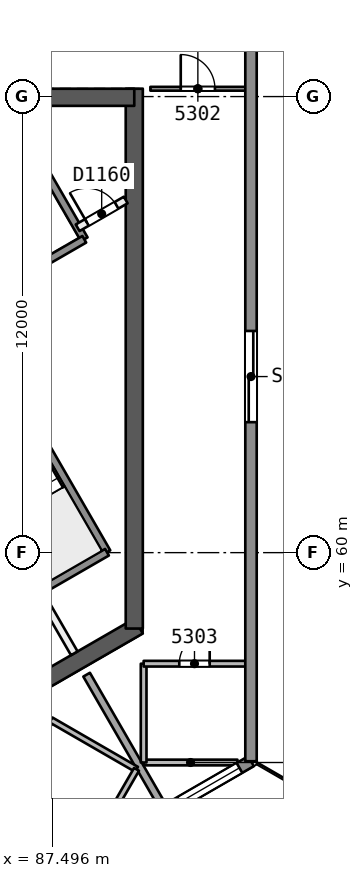
"""IFC4 building model, lengths in metres.
Left out: names, types, materials, properties, quantities, classifications, styles, units other than length and angle.
Written with IfcOpenShell. Run it as: python <this file> out.ifc"""

import sys

from ifc_helpers import new_model, si_unit, direction, frame, frame_2d, origin, place, context, subcontext, project, spatial, rectangle, extrude, element, fill, save


model = new_model("IFC4")
c1 = context("Model", 3, precision=1e-05, world=origin(), true_north=direction((0.0, 1.0)))
c2 = subcontext(c1, "Body", "Model", "MODEL_VIEW")
j1 = project(units=[si_unit("LENGTHUNIT", "METRE"), si_unit("PLANEANGLEUNIT", "RADIAN")], contexts=[c1])
p1 = place(None, origin())
s1 = spatial("IfcSite", under=j1, at=p1, CompositionType="ELEMENT")
p2 = place(p1, origin())
s2 = spatial("IfcBuilding", under=s1, at=p2, CompositionType="ELEMENT")
p3 = place(p2, frame((0.0, 0.0, 216.9)))
s3 = spatial("IfcBuildingStorey", under=s2, at=p3, CompositionType="ELEMENT", Elevation=216.9)
p4 = place(p3, frame((86.723, 56.31, 0.0), z_axis=(0.0, 0.0, 1.0), x_axis=(0.866042179588, 0.49997094233, 0.0)))
e1 = element("IfcWall", 1, at=p4, inside=s3, PredefinedType="SHEAR", context=c2, shape_type="SweptSolid", body=[
    extrude(rectangle(XDim=3.515, YDim=0.45, at=frame_2d((1.758, 0.0))), origin(), (0.0, 0.0, 1.0), 3.7),
])
p5 = place(p3, frame((89.655, 58.002, 0.0), z_axis=(0.0, 0.0, 1.0), x_axis=(0.0, 1.0, 0.0)))
e2 = element("IfcWall", 2, at=p5, inside=s3, PredefinedType="SHEAR", context=c2, shape_type="SweptSolid", body=[
    extrude(rectangle(XDim=14.204, YDim=0.45, at=frame_2d((7.102, 0.0))), origin(), (0.0, 0.0, 1.0), 3.7),
])
p6 = place(p3, frame((89.655, 71.981, 0.0), z_axis=(0.0, 0.0, 1.0), x_axis=(-1.0, 0.0, 0.0)))
e3 = element("IfcWall", 3, at=p6, inside=s3, PredefinedType="SHEAR", context=c2, shape_type="SweptSolid", body=[
    extrude(rectangle(XDim=10.155, YDim=0.45, at=frame_2d((5.078, 0.0))), origin(), (0.0, 0.0, 1.0), 3.7),
])
p7 = place(p6, frame((8.005, 0.0, 0.0)))
e4 = element("IfcOpeningElement", 4, at=p7, cuts=e3, PredefinedType="OPENING", context=c2, shape_type="SweptSolid", body=[
    extrude(rectangle(XDim=1.2, YDim=2.1, at=frame_2d((0.6, 1.05))), frame((0.0, 0.235, 0.0), z_axis=(0.0, -1.0, 0.0), x_axis=(1.0, 0.0, 0.0)), (0.0, 0.0, 1.0), 0.471),
])
p8 = place(p3, frame((90.079, 72.206, 0.0), z_axis=(0.0, 0.0, 1.0), x_axis=(1.0, 0.0, 0.0)))
e5 = element("IfcWall", 5, at=p8, inside=s3, PredefinedType="PARTITIONING", context=c2, shape_type="SweptSolid", body=[
    extrude(rectangle(XDim=2.499, YDim=0.1, at=frame_2d((1.249, 0.0))), origin(), (0.0, 0.0, 1.0), 3.3),
])
p9 = place(p8, frame((0.799, 0.0, 0.0)))
e6 = element("IfcOpeningElement", 6, at=p9, cuts=e5, PredefinedType="OPENING", context=c2, shape_type="SweptSolid", body=[
    extrude(rectangle(XDim=0.9, YDim=2.1, at=frame_2d((0.45, 1.05))), frame((0.0, 0.061, 0.0), z_axis=(0.0, -1.0, 0.0), x_axis=(1.0, 0.0, 0.0)), (0.0, 0.0, 1.0), 0.121),
])
p10 = place(p3, frame((92.37, 54.478, 0.0), z_axis=(0.0, 0.0, 1.0), x_axis=(-1.0, 0.0, 0.0)))
e7 = element("IfcWall", 7, at=p10, inside=s3, PredefinedType="PARTITIONING", context=c2, shape_type="SweptSolid", body=[
    extrude(rectangle(XDim=2.469, YDim=0.15, at=frame_2d((1.234, 0.0))), origin(), (0.0, 0.0, 1.0), 3.3),
])
p11 = place(p3, frame((89.902, 54.478, 0.0), z_axis=(0.0, 0.0, 1.0), x_axis=(0.0, 1.0, 0.0)))
e8 = element("IfcWall", 8, at=p11, inside=s3, PredefinedType="PARTITIONING", context=c2, shape_type="SweptSolid", body=[
    extrude(rectangle(XDim=2.6, YDim=0.15, at=frame_2d((1.3, 0.0))), origin(), (0.0, 0.0, 1.0), 3.3),
])
p12 = place(p3, frame((89.902, 57.078, 0.0), z_axis=(0.0, 0.0, 1.0), x_axis=(1.0, 0.0, 0.0)))
e9 = element("IfcWall", 9, at=p12, inside=s3, PredefinedType="PARTITIONING", context=c2, shape_type="SweptSolid", body=[
    extrude(rectangle(XDim=2.676, YDim=0.15, at=frame_2d((1.338, 0.0))), origin(), (0.0, 0.0, 1.0), 3.3),
])
p13 = place(p12, frame((0.938, 0.0, 0.0)))
e10 = element("IfcOpeningElement", 10, at=p13, cuts=e9, PredefinedType="OPENING", context=c2, shape_type="SweptSolid", body=[
    extrude(rectangle(XDim=0.8, YDim=2.1, at=frame_2d((0.4, 1.05))), frame((0.0, 0.085, 0.0), z_axis=(0.0, -1.0, 0.0), x_axis=(1.0, 0.0, 0.0)), (0.0, 0.0, 1.0), 0.171),
])
p14 = place(p3, frame((88.401, 56.789, 0.0), z_axis=(0.0, 0.0, 1.0), x_axis=(0.49999285859, -0.86602952684, 0.0)))
e11 = element("IfcWall", 11, at=p14, inside=s3, PredefinedType="PARTITIONING", context=c2, shape_type="SweptSolid", body=[
    extrude(rectangle(XDim=3.986, YDim=0.2, at=frame_2d((1.993, 0.0))), origin(), (0.0, 0.0, 1.0), 3.3),
])
p15 = place(p3, frame((86.125, 53.28, 0.0), z_axis=(0.0, 0.0, 1.0), x_axis=(0.500054140411, 0.865994143547, 0.0)))
e12 = element("IfcWall", 12, at=p15, inside=s3, PredefinedType="PARTITIONING", context=c2, shape_type="SweptSolid", body=[
    extrude(rectangle(XDim=2.676, YDim=0.15, at=frame_2d((1.338, 0.0))), origin(), (0.0, 0.0, 1.0), 3.3),
])
p16 = place(p15, frame((0.938, 0.0, 0.0)))
e13 = element("IfcOpeningElement", 13, at=p16, cuts=e12, PredefinedType="OPENING", context=c2, shape_type="SweptSolid", body=[
    extrude(rectangle(XDim=0.8, YDim=2.1, at=frame_2d((0.4, 1.05))), frame((0.0, 0.085, 0.0), z_axis=(0.0, -1.0, 0.0), x_axis=(1.0, 0.0, 0.0)), (0.0, 0.0, 1.0), 0.171),
])
p17 = place(p3, frame((87.463, 55.598, 0.0), z_axis=(0.0, 0.0, 1.0), x_axis=(0.866062058628, -0.499936506574, 0.0)))
e14 = element("IfcWall", 14, at=p17, inside=s3, PredefinedType="PARTITIONING", context=c2, shape_type="SweptSolid", body=[
    extrude(rectangle(XDim=2.6, YDim=0.15, at=frame_2d((1.3, 0.0))), origin(), (0.0, 0.0, 1.0), 3.3),
])
p18 = place(p3, frame((89.715, 54.298, 0.0), z_axis=(0.0, 0.0, 1.0), x_axis=(-0.500025973189, -0.866010407637, 0.0)))
e15 = element("IfcWall", 15, at=p18, inside=s3, PredefinedType="PARTITIONING", context=c2, shape_type="SweptSolid", body=[
    extrude(rectangle(XDim=2.344, YDim=0.15, at=frame_2d((1.172, 0.0))), origin(), (0.0, 0.0, 1.0), 3.3),
])
p19 = place(p3, frame((92.727, 54.511, 0.0), z_axis=(0.0, 0.0, 1.0), x_axis=(-0.866045268016, -0.499965592563, 0.0)))
e16 = element("IfcWall", 16, at=p19, inside=s3, PredefinedType="SOLIDWALL", context=c2, shape_type="SweptSolid", body=[
    extrude(rectangle(XDim=5.215, YDim=0.3, at=frame_2d((2.607, 0.0))), origin(), (0.0, 0.0, 1.0), 3.3),
])
p20 = place(p19, frame((0.351, 0.0, 0.9)))
e17 = element("IfcOpeningElement", 17, at=p20, cuts=e16, PredefinedType="OPENING", context=c2, shape_type="SweptSolid", body=[
    extrude(rectangle(XDim=1.8, YDim=1.5, at=frame_2d((0.9, 0.75))), frame((0.0, 0.161, 0.0), z_axis=(0.0, -1.0, 0.0), x_axis=(1.0, 0.0, 0.0)), (0.0, 0.0, 1.0), 0.321),
])
p21 = place(p19, frame((3.036, 0.0, 0.9)))
e18 = element("IfcOpeningElement", 18, at=p21, cuts=e16, PredefinedType="OPENING", context=c2, shape_type="SweptSolid", body=[
    extrude(rectangle(XDim=1.8, YDim=1.5, at=frame_2d((0.9, 0.75))), frame((0.0, 0.161, 0.0), z_axis=(0.0, -1.0, 0.0), x_axis=(1.0, 0.0, 0.0)), (0.0, 0.0, 1.0), 0.321),
])
p22 = place(p3, frame((92.727, 105.489, 0.0), z_axis=(0.0, 0.0, 1.0), x_axis=(0.0, -1.0, 0.0)))
e19 = element("IfcWall", 19, at=p22, inside=s3, PredefinedType="SOLIDWALL", context=c2, shape_type="SweptSolid", body=[
    extrude(rectangle(XDim=50.977, YDim=0.3, at=frame_2d((25.489, 0.0))), origin(), (0.0, 0.0, 1.0), 3.3),
])
p23 = place(p22, frame((9.942, 0.0, 0.0)))
e20 = element("IfcOpeningElement", 20, at=p23, cuts=e19, PredefinedType="OPENING", context=c2, shape_type="SweptSolid", body=[
    extrude(rectangle(XDim=2.4, YDim=2.4, at=frame_2d((1.2, 1.2))), frame((0.0, 0.161, 0.0), z_axis=(0.0, -1.0, 0.0), x_axis=(1.0, 0.0, 0.0)), (0.0, 0.0, 1.0), 0.321),
])
p24 = place(p22, frame((28.965, 0.0, 0.0)))
e21 = element("IfcOpeningElement", 21, at=p24, cuts=e19, PredefinedType="OPENING", context=c2, shape_type="SweptSolid", body=[
    extrude(rectangle(XDim=2.4, YDim=2.4, at=frame_2d((1.2, 1.2))), frame((0.0, 0.161, 0.0), z_axis=(0.0, -1.0, 0.0), x_axis=(1.0, 0.0, 0.0)), (0.0, 0.0, 1.0), 0.321),
])
p25 = place(p22, frame((39.656, 0.0, 0.0)))
e22 = element("IfcOpeningElement", 22, at=p25, cuts=e19, PredefinedType="OPENING", context=c2, shape_type="SweptSolid", body=[
    extrude(rectangle(XDim=2.4, YDim=2.4, at=frame_2d((1.2, 1.2))), frame((0.0, 0.161, 0.0), z_axis=(0.0, -1.0, 0.0), x_axis=(1.0, 0.0, 0.0)), (0.0, 0.0, 1.0), 0.321),
])
p26 = place(p22, frame((23.509, 0.0, 0.0)))
e23 = element("IfcOpeningElement", 23, at=p26, cuts=e19, PredefinedType="OPENING", context=c2, shape_type="SweptSolid", body=[
    extrude(rectangle(XDim=2.4, YDim=2.4, at=frame_2d((1.2, 1.2))), frame((0.0, 0.161, 0.0), z_axis=(0.0, -1.0, 0.0), x_axis=(1.0, 0.0, 0.0)), (0.0, 0.0, 1.0), 0.321),
])
p27 = place(p3, frame((88.21, 51.904, 0.0), z_axis=(0.0, 0.0, 1.0), x_axis=(-0.866024402399, 0.500001734447, 0.0)))
e24 = element("IfcWall", 24, at=p27, inside=s3, PredefinedType="SOLIDWALL", context=c2, shape_type="SweptSolid", body=[
    extrude(rectangle(XDim=50.977, YDim=0.3, at=frame_2d((25.488, 0.0))), origin(), (0.0, 0.0, 1.0), 3.3),
])
p28 = place(p27, frame((24.756, 0.0, 0.0)))
e25 = element("IfcOpeningElement", 25, at=p28, cuts=e24, PredefinedType="OPENING", context=c2, shape_type="SweptSolid", body=[
    extrude(rectangle(XDim=2.4, YDim=2.4, at=frame_2d((1.2, 1.2))), frame((0.0, 0.161, 0.0), z_axis=(0.0, -1.0, 0.0), x_axis=(1.0, 0.0, 0.0)), (0.0, 0.0, 1.0), 0.321),
])
p29 = place(p27, frame((19.612, 0.0, 0.0)))
e26 = element("IfcOpeningElement", 26, at=p29, cuts=e24, PredefinedType="OPENING", context=c2, shape_type="SweptSolid", body=[
    extrude(rectangle(XDim=2.4, YDim=2.4, at=frame_2d((1.2, 1.2))), frame((0.0, 0.161, 0.0), z_axis=(0.0, -1.0, 0.0), x_axis=(1.0, 0.0, 0.0)), (0.0, 0.0, 1.0), 0.321),
])
p30 = place(p27, frame((8.885, 0.0, 0.0)))
e27 = element("IfcOpeningElement", 27, at=p30, cuts=e24, PredefinedType="OPENING", context=c2, shape_type="SweptSolid", body=[
    extrude(rectangle(XDim=2.4, YDim=2.4, at=frame_2d((1.2, 1.2))), frame((0.0, 0.161, 0.0), z_axis=(0.0, -1.0, 0.0), x_axis=(1.0, 0.0, 0.0)), (0.0, 0.0, 1.0), 0.321),
])
p31 = place(p27, frame((38.323, 0.0, 0.0)))
e28 = element("IfcOpeningElement", 28, at=p31, cuts=e24, PredefinedType="OPENING", context=c2, shape_type="SweptSolid", body=[
    extrude(rectangle(XDim=2.4, YDim=2.4, at=frame_2d((1.2, 1.2))), frame((0.0, 0.161, 0.0), z_axis=(0.0, -1.0, 0.0), x_axis=(1.0, 0.0, 0.0)), (0.0, 0.0, 1.0), 0.321),
])
p32 = place(p3, frame((87.09, 59.06, 0.0), z_axis=(0.0, 0.0, 1.0), x_axis=(0.500011643316, -0.866018681408, 0.0)))
e29 = element("IfcWall", 29, at=p32, inside=s3, PredefinedType="PARTITIONING", context=c2, shape_type="SweptSolid", body=[
    extrude(rectangle(XDim=1.973, YDim=0.2, at=frame_2d((0.987, 0.0))), origin(), (0.0, 0.0, 1.0), 3.3),
])
p33 = place(p3, frame((85.087, 66.679, 0.0), z_axis=(0.0, 0.0, 1.0), x_axis=(0.500019787375, -0.866013979237, 0.0)))
e30 = element("IfcWall", 30, at=p33, inside=s3, PredefinedType="SOLIDWALL", context=c2, shape_type="SweptSolid", body=[
    extrude(rectangle(XDim=7.7, YDim=0.2, at=frame_2d((3.85, 0.0))), origin(), (0.0, 0.0, 1.0), 3.3),
])
p34 = place(p33, frame((0.55, 0.0, 0.0)))
e31 = element("IfcOpeningElement", 31, at=p34, cuts=e30, PredefinedType="OPENING", context=c2, shape_type="SweptSolid", body=[
    extrude(rectangle(XDim=1.1, YDim=2.1, at=frame_2d((0.55, 1.05))), frame((0.0, 0.11, 0.0), z_axis=(0.0, -1.0, 0.0), x_axis=(1.0, 0.0, 0.0)), (0.0, 0.0, 1.0), 0.221),
])
p35 = place(p3, frame((86.965, 70.626, 0.0), z_axis=(0.0, 0.0, 1.0), x_axis=(0.499996545922, -0.866027397988, 0.0)))
e32 = element("IfcWall", 32, at=p35, inside=s3, PredefinedType="SOLIDWALL", context=c2, shape_type="SweptSolid", body=[
    extrude(rectangle(XDim=2.75, YDim=0.2, at=frame_2d((1.375, 0.0))), origin(), (0.0, 0.0, 1.0), 3.3),
])
p36 = place(p3, frame((88.165, 68.548, 0.0), z_axis=(0.0, 0.0, 1.0), x_axis=(0.866013036001, 0.500021421018, 0.0)))
e33 = element("IfcWall", 33, at=p36, inside=s3, PredefinedType="PARTITIONING", context=c2, shape_type="SweptSolid", body=[
    extrude(rectangle(XDim=1.461, YDim=0.2, at=frame_2d((0.73, 0.0))), origin(), (0.0, 0.0, 1.0), 3.3),
])
p37 = place(p36, frame((0.281, 0.0, 0.0)))
e34 = element("IfcOpeningElement", 34, at=p37, cuts=e33, PredefinedType="OPENING", context=c2, shape_type="SweptSolid", body=[
    extrude(rectangle(XDim=0.9, YDim=2.1, at=frame_2d((0.45, 1.05))), frame((0.0, 0.11, 0.0), z_axis=(0.0, -1.0, 0.0), x_axis=(1.0, 0.0, 0.0)), (0.0, 0.0, 1.0), 0.221),
])
p38 = place(p3, frame((86.348, 67.095, 0.0), z_axis=(0.0, 0.0, 1.0), x_axis=(0.86602648383, 0.499998129301, 0.0)))
e35 = element("IfcWall", 35, at=p38, inside=s3, PredefinedType="SOLIDWALL", context=c2, shape_type="SweptSolid", body=[
    extrude(rectangle(XDim=2.3, YDim=0.2, at=frame_2d((1.15, 0.0))), origin(), (0.0, 0.0, 1.0), 3.3),
])
p39 = place(p3, frame((85.343, 57.935, 0.0), z_axis=(0.0, 0.0, 1.0), x_axis=(0.866004344652, 0.500036473714, 0.0)))
e36 = element("IfcWall", 36, at=p39, inside=s3, PredefinedType="SOLIDWALL", context=c2, shape_type="SweptSolid", body=[
    extrude(rectangle(XDim=4.15, YDim=0.2, at=frame_2d((2.075, 0.0))), origin(), (0.0, 0.0, 1.0), 3.3),
])
p40 = place(p9, origin())
e37 = element("IfcDoor", 37, at=p40, inside=s3, OperationType="SINGLE_SWING_LEFT", PredefinedType="NOTDEFINED", context=c2, shape_type="SweptSolid", body=[
    extrude(rectangle(XDim=0.9, YDim=2.1, at=frame_2d((0.45, 1.05))), frame((0.0, 0.025, 0.0), z_axis=(0.0, -1.0, 0.0), x_axis=(1.0, 0.0, 0.0)), (0.0, 0.0, 1.0), 0.05),
])
fill(e6, e37)
p41 = place(p13, origin())
e38 = element("IfcDoor", 38, at=p41, inside=s3, OperationType="SINGLE_SWING_RIGHT", PredefinedType="NOTDEFINED", context=c2, shape_type="SweptSolid", body=[
    extrude(rectangle(XDim=0.8, YDim=2.1, at=frame_2d((0.4, 1.05))), frame((0.0, 0.025, 0.0), z_axis=(0.0, -1.0, 0.0), x_axis=(1.0, 0.0, 0.0)), (0.0, 0.0, 1.0), 0.05),
])
fill(e10, e38)
p42 = place(p20, origin())
e39 = element("IfcWindow", 39, at=p42, inside=s3, PartitioningType="SINGLE_PANEL", PredefinedType="WINDOW", context=c2, shape_type="SweptSolid", body=[
    extrude(rectangle(XDim=1.8, YDim=1.5, at=frame_2d((0.9, 0.75))), frame((0.0, 0.03, 0.0), z_axis=(0.0, -1.0, 0.0), x_axis=(1.0, 0.0, 0.0)), (0.0, 0.0, 1.0), 0.06),
])
fill(e17, e39)
p43 = place(p25, origin())
e40 = element("IfcDoor", 40, at=p43, inside=s3, OperationType="SLIDING_TO_LEFT", PredefinedType="NOTDEFINED", context=c2, shape_type="SweptSolid", body=[
    extrude(rectangle(XDim=2.4, YDim=2.4, at=frame_2d((1.2, 1.2))), frame((0.0, 0.025, 0.0), z_axis=(0.0, -1.0, 0.0), x_axis=(1.0, 0.0, 0.0)), (0.0, 0.0, 1.0), 0.05),
])
fill(e22, e40)
p44 = place(p37, origin())
e41 = element("IfcDoor", 41, at=p44, inside=s3, OperationType="SINGLE_SWING_LEFT", PredefinedType="NOTDEFINED", context=c2, shape_type="SweptSolid", body=[
    extrude(rectangle(XDim=0.9, YDim=2.1, at=frame_2d((0.45, 1.05))), frame((0.0, 0.025, 0.0), z_axis=(0.0, -1.0, 0.0), x_axis=(1.0, 0.0, 0.0)), (0.0, 0.0, 1.0), 0.05),
])
fill(e34, e41)
save(model, sys.argv[1])
